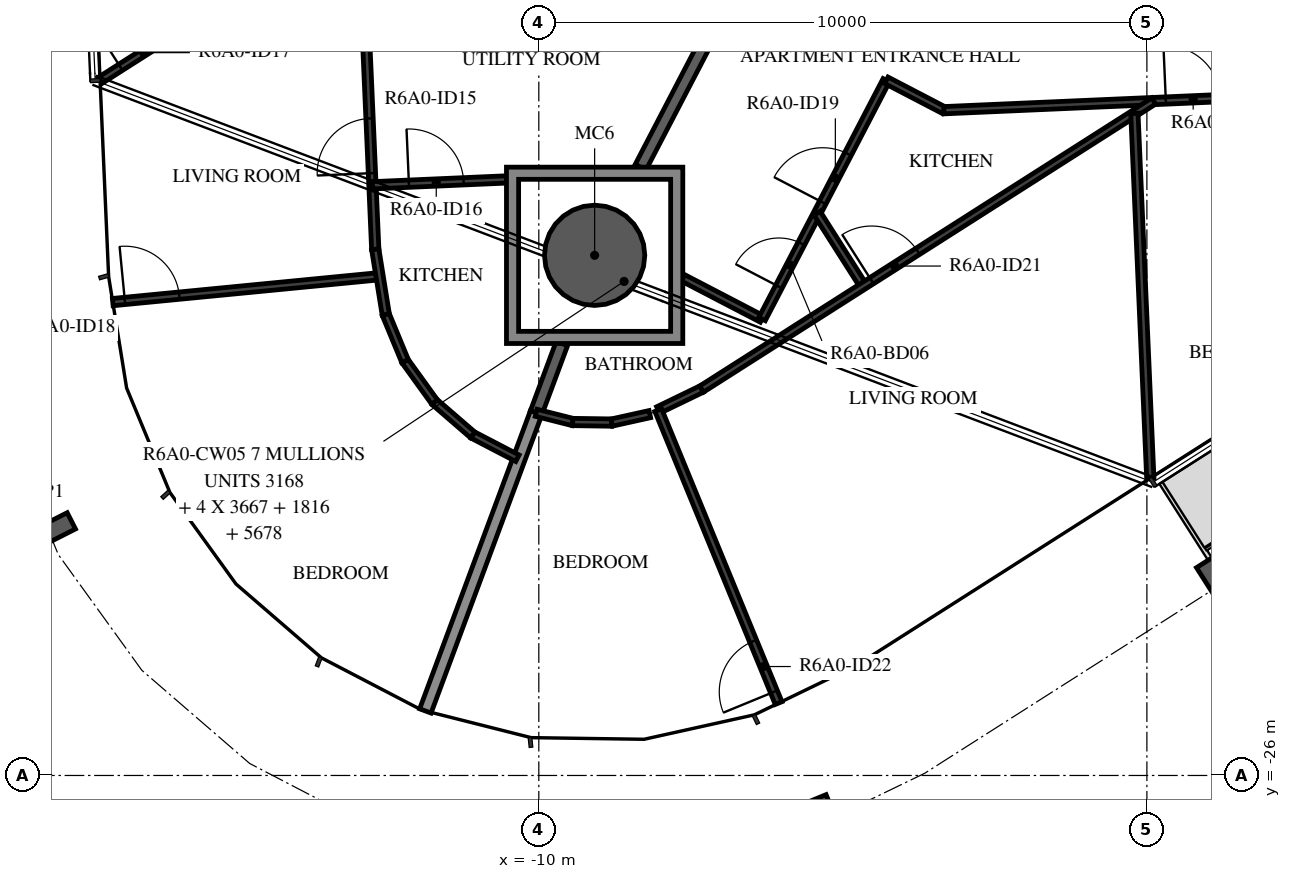
"""IFC4 building model, lengths in metres.
Left out: names, types, materials, properties, quantities, classifications, styles, units other than length and angle.
Written with IfcOpenShell. Run it as: python <this file> out.ifc"""

import sys

from ifc_helpers import new_model, si_unit, direction, frame, frame_2d, origin, origin_2d, place, context, subcontext, project, spatial, polyline, rectangle, hollow_circle, i_section, outline, extrude, element, fill, save


model = new_model("IFC4")
c1 = context("Model", 3, precision=1e-05, world=origin(), true_north=direction((0.0, 1.0)))
c2 = subcontext(c1, "Body", "Model", "MODEL_VIEW")
j1 = project(units=[si_unit("LENGTHUNIT", "METRE"), si_unit("PLANEANGLEUNIT", "RADIAN")], contexts=[c1])
p1 = place(None, origin())
s1 = spatial("IfcSite", under=j1, at=p1, CompositionType="ELEMENT")
p2 = place(p1, origin())
s2 = spatial("IfcBuilding", under=s1, at=p2, CompositionType="ELEMENT")
p3 = place(p2, frame((0.0, 0.0, 233.7)))
s3 = spatial("IfcBuildingStorey", under=s2, at=p3, CompositionType="ELEMENT", Elevation=233.7)
p4 = place(p3, frame((-9.082, -17.446, -0.38), z_axis=(0.0, 0.0, 1.0), x_axis=(1.0, 0.0, 0.0)))
e1 = element("IfcColumn", 1, at=p4, inside=s3, PredefinedType="COLUMN", context=c2, shape_type="SweptSolid", body=[
    extrude(hollow_circle(Radius=0.825, WallThickness=0.04, at=origin_2d()), origin(), (0.0, 0.0, 1.0), 3.5),
])
for number, where, z_axis, x_axis in (
    (2, (-18.089, -22.016, -0.38), (0.0, 0.0, 1.0), (-0.452, 0.892, 0.0)),
    (3, (-5.243, -26.789, -0.38), (0.0, 0.0, 1.0), (-0.925, -0.38, 0.0)),
    (4, (1.185, -22.881, -0.38), (0.0, 0.0, 1.0), (-0.843, -0.537, 0.0)),
):
    element("IfcColumn", number, at=place(p3, frame(where, z_axis=z_axis, x_axis=x_axis)), inside=s3, PredefinedType="COLUMN", context=c2, shape_type="SweptSolid", body=[
        extrude(i_section(OverallWidth=0.3, OverallDepth=0.9, WebThickness=0.019, FlangeThickness=0.035, FilletRadius=0.03, at=origin_2d()), origin(), (0.0, 0.0, 1.0), 3.5),
    ])
p5 = place(p3, frame((-8.326, -15.996, 0.0), z_axis=(0.0, 0.0, 1.0), x_axis=(0.461739255077, 0.887015704664, 0.0)))
e5 = element("IfcWall", 5, at=p5, inside=s3, PredefinedType="STANDARD", context=c2, shape_type="SweptSolid", body=[
    extrude(rectangle(XDim=4.633, YDim=0.2, at=frame_2d((2.317, 0.0))), origin(), (0.0, 0.0, 1.0), 3.12),
])
p6 = place(p3, frame((-11.865, -24.939, 0.0), z_axis=(0.0, 0.0, 1.0), x_axis=(0.348236919929, 0.937406554062, 0.0)))
e6 = element("IfcWall", 6, at=p6, inside=s3, PredefinedType="STANDARD", context=c2, shape_type="SweptSolid", body=[
    extrude(rectangle(XDim=5.231, YDim=0.2, at=frame_2d((2.615, 0.0))), origin(), (0.0, 0.0, 1.0), 2.73),
])
p7 = place(p3, frame((-10.044, -20.036, 0.0), z_axis=(0.0, 0.0, 1.0), x_axis=(0.348282344491, 0.937389678051, 0.0)))
e7 = element("IfcWall", 7, at=p7, inside=s3, PredefinedType="STANDARD", context=c2, shape_type="SweptSolid", body=[
    extrude(rectangle(XDim=1.216, YDim=0.2, at=frame_2d((0.608, 0.0))), origin(), (0.0, 0.0, 1.0), 3.12),
])
p8 = place(p3, frame((-17.215, -14.57, 0.0), z_axis=(0.0, 0.0, 1.0), x_axis=(0.843396239681, 0.537292083407, 0.0)))
e8 = element("IfcWall", 8, at=p8, inside=s3, PredefinedType="PARTITIONING", context=c2, shape_type="SweptSolid", body=[
    extrude(rectangle(XDim=5.081, YDim=0.12, at=frame_2d((2.54, 0.0))), origin(), (0.0, 0.0, 1.0), 3.12),
])
p9 = place(p8, frame((0.4, 0.0, 0.0)))
e9 = element("IfcOpeningElement", 9, at=p9, cuts=e8, PredefinedType="OPENING", context=c2, shape_type="SweptSolid", body=[
    extrude(rectangle(XDim=0.9, YDim=2.1, at=frame_2d((0.45, 1.05))), frame((0.0, 0.07, 0.0), z_axis=(0.0, -1.0, 0.0), x_axis=(1.0, 0.0, 0.0)), (0.0, 0.0, 1.0), 0.14),
])
p10 = place(p3, frame((-12.69, -17.347, 0.0), z_axis=(0.0, 0.0, 1.0), x_axis=(-0.043618497177, 0.999048260448, 0.0)))
e10 = element("IfcWall", 10, at=p10, inside=s3, PredefinedType="PARTITIONING", context=c2, shape_type="SweptSolid", body=[
    extrude(rectangle(XDim=5.552, YDim=0.12, at=frame_2d((2.776, 0.0))), origin(), (0.0, 0.0, 1.0), 3.12),
])
p11 = place(p10, frame((1.254, 0.0, 0.0)))
e11 = element("IfcOpeningElement", 11, at=p11, cuts=e10, PredefinedType="OPENING", context=c2, shape_type="SweptSolid", body=[
    extrude(rectangle(XDim=0.9, YDim=2.1, at=frame_2d((0.45, 1.05))), frame((0.0, 0.07, 0.0), z_axis=(0.0, -1.0, 0.0), x_axis=(1.0, 0.0, 0.0)), (0.0, 0.0, 1.0), 0.14),
])
p12 = place(p3, frame((-17.007, -18.216, 0.0), z_axis=(0.0, 0.0, 1.0), x_axis=(0.995320337688, 0.09663035436, 0.0)))
e12 = element("IfcWall", 12, at=p12, inside=s3, PredefinedType="PARTITIONING", context=c2, shape_type="SweptSolid", body=[
    extrude(rectangle(XDim=4.409, YDim=0.12, at=frame_2d((2.205, 0.0))), origin(), (0.0, 0.0, 1.0), 3.12),
])
p13 = place(p12, frame((0.2, 0.0, 0.0)))
e13 = element("IfcOpeningElement", 13, at=p13, cuts=e12, PredefinedType="OPENING", context=c2, shape_type="SweptSolid", body=[
    extrude(rectangle(XDim=0.9, YDim=2.1, at=frame_2d((0.45, 1.05))), frame((0.0, 0.07, 0.0), z_axis=(0.0, -1.0, 0.0), x_axis=(1.0, 0.0, 0.0)), (0.0, 0.0, 1.0), 0.14),
])
p14 = place(p3, frame((-12.517, -18.42, 0.0), z_axis=(0.0, 0.0, 1.0), x_axis=(-0.159260688022, 0.987236563976, 0.0)))
e14 = element("IfcWall", 14, at=p14, inside=s3, PredefinedType="PARTITIONING", context=c2, shape_type="SweptSolid", body=[
    extrude(rectangle(XDim=1.087, YDim=0.12, at=frame_2d((0.543, 0.0))), origin(), (0.0, 0.0, 1.0), 3.12),
])
p15 = place(p3, frame((-12.736, -16.295, 0.0), z_axis=(0.0, 0.0, 1.0), x_axis=(0.999043796611, 0.043720618177, 0.0)))
e15 = element("IfcWall", 15, at=p15, inside=s3, PredefinedType="PARTITIONING", context=c2, shape_type="SweptSolid", body=[
    extrude(rectangle(XDim=2.206, YDim=0.12, at=frame_2d((1.103, 0.0))), origin(), (0.0, 0.0, 1.0), 3.12),
])
p16 = place(p15, frame((0.6, 0.0, 0.0)))
e16 = element("IfcOpeningElement", 16, at=p16, cuts=e15, PredefinedType="OPENING", context=c2, shape_type="SweptSolid", body=[
    extrude(rectangle(XDim=0.9, YDim=2.1, at=frame_2d((0.45, 1.05))), frame((0.0, 0.07, 0.0), z_axis=(0.0, -1.0, 0.0), x_axis=(1.0, 0.0, 0.0)), (0.0, 0.0, 1.0), 0.14),
])
for number, where, z_axis, x_axis in (
    (17, (-10.352, -20.783, 0.0), (0.0, 0.0, 1.0), (-0.887, 0.462, 0.0)),
    (18, (-11.087, -20.4, 0.0), (0.0, 0.0, 1.0), (-0.757, 0.654, 0.0)),
):
    element("IfcWall", number, at=place(p3, frame(where, z_axis=z_axis, x_axis=x_axis)), inside=s3, PredefinedType="PARTITIONING", context=c2, shape_type="SweptSolid", body=[
        extrude(rectangle(XDim=0.829, YDim=0.12, at=frame_2d((0.415, 0.0))), origin(), (0.0, 0.0, 1.0), 3.12),
    ])
p17 = place(p3, frame((-11.714, -19.858, 0.0), z_axis=(0.0, 0.0, 1.0), x_axis=(-0.585436792562, 0.810718053281, 0.0)))
e19 = element("IfcWall", 19, at=p17, inside=s3, PredefinedType="PARTITIONING", context=c2, shape_type="SweptSolid", body=[
    extrude(rectangle(XDim=0.829, YDim=0.12, at=frame_2d((0.415, 0.0))), origin(), (0.0, 0.0, 1.0), 3.12),
])
p18 = place(p3, frame((-12.199, -19.186, 0.0), z_axis=(0.0, 0.0, 1.0), x_axis=(-0.382585904135, 0.923919923996, 0.0)))
e20 = element("IfcWall", 20, at=p18, inside=s3, PredefinedType="PARTITIONING", context=c2, shape_type="SweptSolid", body=[
    extrude(rectangle(XDim=0.829, YDim=0.12, at=frame_2d((0.415, 0.0))), origin(), (0.0, 0.0, 1.0), 3.12),
])
p19 = place(p3, frame((-7.632, -17.815, 0.0), z_axis=(0.0, 0.0, 1.0), x_axis=(0.886960889958, -0.461844540602, 0.0)))
e21 = element("IfcWall", 21, at=p19, inside=s3, PredefinedType="PARTITIONING", context=c2, shape_type="SweptSolid", body=[
    extrude(rectangle(XDim=1.469, YDim=0.12, at=frame_2d((0.734, 0.0))), origin(), (0.0, 0.0, 1.0), 3.12),
])
p20 = place(p3, frame((-6.329, -18.494, 0.0), z_axis=(0.0, 0.0, 1.0), x_axis=(0.461759058182, 0.887005395805, 0.0)))
e22 = element("IfcWall", 22, at=p20, inside=s3, PredefinedType="PARTITIONING", context=c2, shape_type="SweptSolid", body=[
    extrude(rectangle(XDim=4.427, YDim=0.12, at=frame_2d((2.213, 0.0))), origin(), (0.0, 0.0, 1.0), 3.12),
])
p21 = place(p20, frame((0.6, 0.0, 0.0)))
e23 = element("IfcOpeningElement", 23, at=p21, cuts=e22, PredefinedType="OPENING", context=c2, shape_type="SweptSolid", body=[
    extrude(rectangle(XDim=0.8, YDim=2.1, at=frame_2d((0.4, 1.05))), frame((0.0, 0.07, 0.0), z_axis=(0.0, -1.0, 0.0), x_axis=(1.0, 0.0, 0.0)), (0.0, 0.0, 1.0), 0.14),
])
p22 = place(p20, frame((2.161, 0.0, 0.0)))
e24 = element("IfcOpeningElement", 24, at=p22, cuts=e22, PredefinedType="OPENING", context=c2, shape_type="SweptSolid", body=[
    extrude(rectangle(XDim=0.9, YDim=2.1, at=frame_2d((0.45, 1.05))), frame((0.0, 0.07, 0.0), z_axis=(0.0, -1.0, 0.0), x_axis=(1.0, 0.0, 0.0)), (0.0, 0.0, 1.0), 0.14),
])
p23 = place(p3, frame((-4.285, -14.567, 0.0), z_axis=(0.0, 0.0, 1.0), x_axis=(0.887033177378, -0.46170568789, 0.0)))
e25 = element("IfcWall", 25, at=p23, inside=s3, PredefinedType="PARTITIONING", context=c2, shape_type="SweptSolid", body=[
    extrude(rectangle(XDim=1.067, YDim=0.12, at=frame_2d((0.534, 0.0))), origin(), (0.0, 0.0, 1.0), 3.12),
])
p24 = place(p3, frame((-3.339, -15.06, 0.0), z_axis=(0.0, 0.0, 1.0), x_axis=(0.999047716945, 0.043630943905, 0.0)))
e26 = element("IfcWall", 26, at=p24, inside=s3, PredefinedType="PARTITIONING", context=c2, shape_type="SweptSolid", body=[
    extrude(rectangle(XDim=7.985, YDim=0.12, at=frame_2d((3.992, 0.0))), origin(), (0.0, 0.0, 1.0), 3.12),
])
p25 = place(p24, frame((3.654, 0.0, 0.0)))
e27 = element("IfcOpeningElement", 27, at=p25, cuts=e26, PredefinedType="OPENING", context=c2, shape_type="SweptSolid", body=[
    extrude(rectangle(XDim=0.9, YDim=2.1, at=frame_2d((0.45, 1.05))), frame((0.0, 0.07, 0.0), z_axis=(0.0, -1.0, 0.0), x_axis=(1.0, 0.0, 0.0)), (0.0, 0.0, 1.0), 0.14),
])
p26 = place(p3, frame((-10.044, -20.036, 0.0), z_axis=(0.0, 0.0, 1.0), x_axis=(0.969630684539, -0.24457378355, 0.0)))
e28 = element("IfcWall", 28, at=p26, inside=s3, PredefinedType="PARTITIONING", context=c2, shape_type="SweptSolid", body=[
    extrude(rectangle(XDim=0.62, YDim=0.12, at=frame_2d((0.31, 0.0))), origin(), (0.0, 0.0, 1.0), 3.12),
])
for number, where, z_axis, x_axis in (
    (29, (-9.443, -20.187, 0.0), (0.0, 0.0, 1.0), (1.0, -0.014, 0.0)),
    (30, (-8.801, -20.197, 0.0), (0.0, 0.0, 1.0), (0.976, 0.216, 0.0)),
):
    element("IfcWall", number, at=place(p3, frame(where, z_axis=z_axis, x_axis=x_axis)), inside=s3, PredefinedType="PARTITIONING", context=c2, shape_type="SweptSolid", body=[
        extrude(rectangle(XDim=0.642, YDim=0.12, at=frame_2d((0.321, 0.0))), origin(), (0.0, 0.0, 1.0), 3.12),
    ])
p27 = place(p3, frame((-4.662, -17.95, 0.0), z_axis=(0.0, 0.0, 1.0), x_axis=(-0.537254271207, 0.843420327043, 0.0)))
e31 = element("IfcWall", 31, at=p27, inside=s3, PredefinedType="PARTITIONING", context=c2, shape_type="SweptSolid", body=[
    extrude(rectangle(XDim=1.418, YDim=0.12, at=frame_2d((0.709, 0.0))), origin(), (0.0, 0.0, 1.0), 3.12),
])
p28 = place(p3, frame((-8.037, -19.991, 0.0), z_axis=(0.0, 0.0, 1.0), x_axis=(0.900073671326, 0.435737749323, 0.0)))
e32 = element("IfcWall", 32, at=p28, inside=s3, PredefinedType="PARTITIONING", context=c2, shape_type="SweptSolid", body=[
    extrude(rectangle(XDim=0.794, YDim=0.12, at=frame_2d((0.397, 0.0))), origin(), (0.0, 0.0, 1.0), 3.12),
])
p29 = place(p3, frame((-7.322, -19.645, 0.0), z_axis=(0.0, 0.0, 1.0), x_axis=(0.843385361817, 0.537309158188, 0.0)))
e33 = element("IfcWall", 33, at=p29, inside=s3, PredefinedType="PARTITIONING", context=c2, shape_type="SweptSolid", body=[
    extrude(rectangle(XDim=8.814, YDim=0.12, at=frame_2d((4.407, 0.0))), origin(), (0.0, 0.0, 1.0), 3.12),
])
p30 = place(p29, frame((3.314, 0.0, 0.0)))
e34 = element("IfcOpeningElement", 34, at=p30, cuts=e33, PredefinedType="OPENING", context=c2, shape_type="SweptSolid", body=[
    extrude(rectangle(XDim=0.9, YDim=2.1, at=frame_2d((0.45, 1.05))), frame((0.0, 0.07, 0.0), z_axis=(0.0, -1.0, 0.0), x_axis=(1.0, 0.0, 0.0)), (0.0, 0.0, 1.0), 0.14),
])
p31 = place(p3, frame((-6.057, -24.81, 0.0), z_axis=(0.0, 0.0, 1.0), x_axis=(-0.380052033163, 0.924965108579, 0.0)))
e35 = element("IfcWall", 35, at=p31, inside=s3, PredefinedType="PARTITIONING", context=c2, shape_type="SweptSolid", body=[
    extrude(rectangle(XDim=5.21, YDim=0.12, at=frame_2d((2.605, 0.0))), origin(), (0.0, 0.0, 1.0), 3.12),
])
p32 = place(p31, frame((0.2, 0.0, 0.0)))
e36 = element("IfcOpeningElement", 36, at=p32, cuts=e35, PredefinedType="OPENING", context=c2, shape_type="SweptSolid", body=[
    extrude(rectangle(XDim=0.9, YDim=2.1, at=frame_2d((0.45, 1.05))), frame((0.0, 0.07, 0.0), z_axis=(0.0, -1.0, 0.0), x_axis=(1.0, 0.0, 0.0)), (0.0, 0.0, 1.0), 0.14),
])
p33 = place(p3, frame((0.056, -21.11, 0.0), z_axis=(0.0, 0.0, 1.0), x_axis=(-0.043629559022, 0.999047777426, 0.0)))
e37 = element("IfcWall", 37, at=p33, inside=s3, PredefinedType="PARTITIONING", context=c2, shape_type="SweptSolid", body=[
    extrude(rectangle(XDim=6.004, YDim=0.12, at=frame_2d((3.002, 0.0))), origin(), (0.0, 0.0, 1.0), 3.12),
])
p34 = place(p3, origin())
e38 = element("IfcWall", 38, at=p34, inside=s3, PredefinedType="STANDARD", context=c2, shape_type="SweptSolid", body=[
    extrude(outline(polyline([(-7.632, -15.996), (-7.632, -18.896), (-10.532, -18.896), (-10.532, -15.996), (-7.632, -15.996)]), holes=[polyline([(-10.332, -18.696), (-7.832, -18.696), (-7.832, -16.196), (-10.332, -16.196), (-10.332, -18.696)])]), origin(), (0.0, 0.0, 1.0), 3.12),
])
p35 = place(p11, origin())
e39 = element("IfcDoor", 39, at=p35, inside=s3, OperationType="SINGLE_SWING_RIGHT", PredefinedType="DOOR", context=c2, shape_type="SweptSolid", body=[
    extrude(rectangle(XDim=0.9, YDim=2.1, at=frame_2d((0.45, 1.05))), frame((0.0, 0.025, 0.0), z_axis=(0.0, -1.0, 0.0), x_axis=(1.0, 0.0, 0.0)), (0.0, 0.0, 1.0), 0.05),
])
fill(e11, e39)
p36 = place(p16, origin())
e40 = element("IfcDoor", 40, at=p36, inside=s3, OperationType="SINGLE_SWING_RIGHT", PredefinedType="DOOR", context=c2, shape_type="SweptSolid", body=[
    extrude(rectangle(XDim=0.9, YDim=2.1, at=frame_2d((0.45, 1.05))), frame((0.0, 0.025, 0.0), z_axis=(0.0, -1.0, 0.0), x_axis=(1.0, 0.0, 0.0)), (0.0, 0.0, 1.0), 0.05),
])
fill(e16, e40)
p37 = place(p9, origin())
e41 = element("IfcDoor", 41, at=p37, inside=s3, OperationType="SINGLE_SWING_LEFT", PredefinedType="DOOR", context=c2, shape_type="SweptSolid", body=[
    extrude(rectangle(XDim=0.9, YDim=2.1, at=frame_2d((0.45, 1.05))), frame((0.0, 0.025, 0.0), z_axis=(0.0, -1.0, 0.0), x_axis=(1.0, 0.0, 0.0)), (0.0, 0.0, 1.0), 0.05),
])
fill(e9, e41)
p38 = place(p13, origin())
e42 = element("IfcDoor", 42, at=p38, inside=s3, OperationType="SINGLE_SWING_RIGHT", PredefinedType="DOOR", context=c2, shape_type="SweptSolid", body=[
    extrude(rectangle(XDim=0.9, YDim=2.1, at=frame_2d((0.45, 1.05))), frame((0.0, 0.025, 0.0), z_axis=(0.0, -1.0, 0.0), x_axis=(1.0, 0.0, 0.0)), (0.0, 0.0, 1.0), 0.05),
])
fill(e13, e42)
p39 = place(p21, origin())
e43 = element("IfcDoor", 43, at=p39, inside=s3, OperationType="SINGLE_SWING_LEFT", PredefinedType="DOOR", context=c2, shape_type="SweptSolid", body=[
    extrude(rectangle(XDim=0.8, YDim=2.1, at=frame_2d((0.4, 1.05))), frame((0.0, 0.025, 0.0), z_axis=(0.0, -1.0, 0.0), x_axis=(1.0, 0.0, 0.0)), (0.0, 0.0, 1.0), 0.05),
])
fill(e23, e43)
p40 = place(p22, origin())
e44 = element("IfcDoor", 44, at=p40, inside=s3, OperationType="SINGLE_SWING_LEFT", PredefinedType="DOOR", context=c2, shape_type="SweptSolid", body=[
    extrude(rectangle(XDim=0.9, YDim=2.1, at=frame_2d((0.45, 1.05))), frame((0.0, 0.025, 0.0), z_axis=(0.0, -1.0, 0.0), x_axis=(1.0, 0.0, 0.0)), (0.0, 0.0, 1.0), 0.05),
])
fill(e24, e44)
p41 = place(p25, origin())
e45 = element("IfcDoor", 45, at=p41, inside=s3, OperationType="SINGLE_SWING_LEFT", PredefinedType="DOOR", context=c2, shape_type="SweptSolid", body=[
    extrude(rectangle(XDim=0.9, YDim=2.1, at=frame_2d((0.45, 1.05))), frame((0.0, 0.025, 0.0), z_axis=(0.0, -1.0, 0.0), x_axis=(1.0, 0.0, 0.0)), (0.0, 0.0, 1.0), 0.05),
])
fill(e27, e45)
p42 = place(p30, origin())
e46 = element("IfcDoor", 46, at=p42, inside=s3, OperationType="SINGLE_SWING_LEFT", PredefinedType="DOOR", context=c2, shape_type="SweptSolid", body=[
    extrude(rectangle(XDim=0.9, YDim=2.1, at=frame_2d((0.45, 1.05))), frame((0.0, 0.025, 0.0), z_axis=(0.0, -1.0, 0.0), x_axis=(1.0, 0.0, 0.0)), (0.0, 0.0, 1.0), 0.05),
])
fill(e34, e46)
p43 = place(p32, origin())
e47 = element("IfcDoor", 47, at=p43, inside=s3, OperationType="SINGLE_SWING_LEFT", PredefinedType="DOOR", context=c2, shape_type="SweptSolid", body=[
    extrude(rectangle(XDim=0.9, YDim=2.1, at=frame_2d((0.45, 1.05))), frame((0.0, 0.025, 0.0), z_axis=(0.0, -1.0, 0.0), x_axis=(1.0, 0.0, 0.0)), (0.0, 0.0, 1.0), 0.05),
])
fill(e36, e47)
save(model, sys.argv[1])
